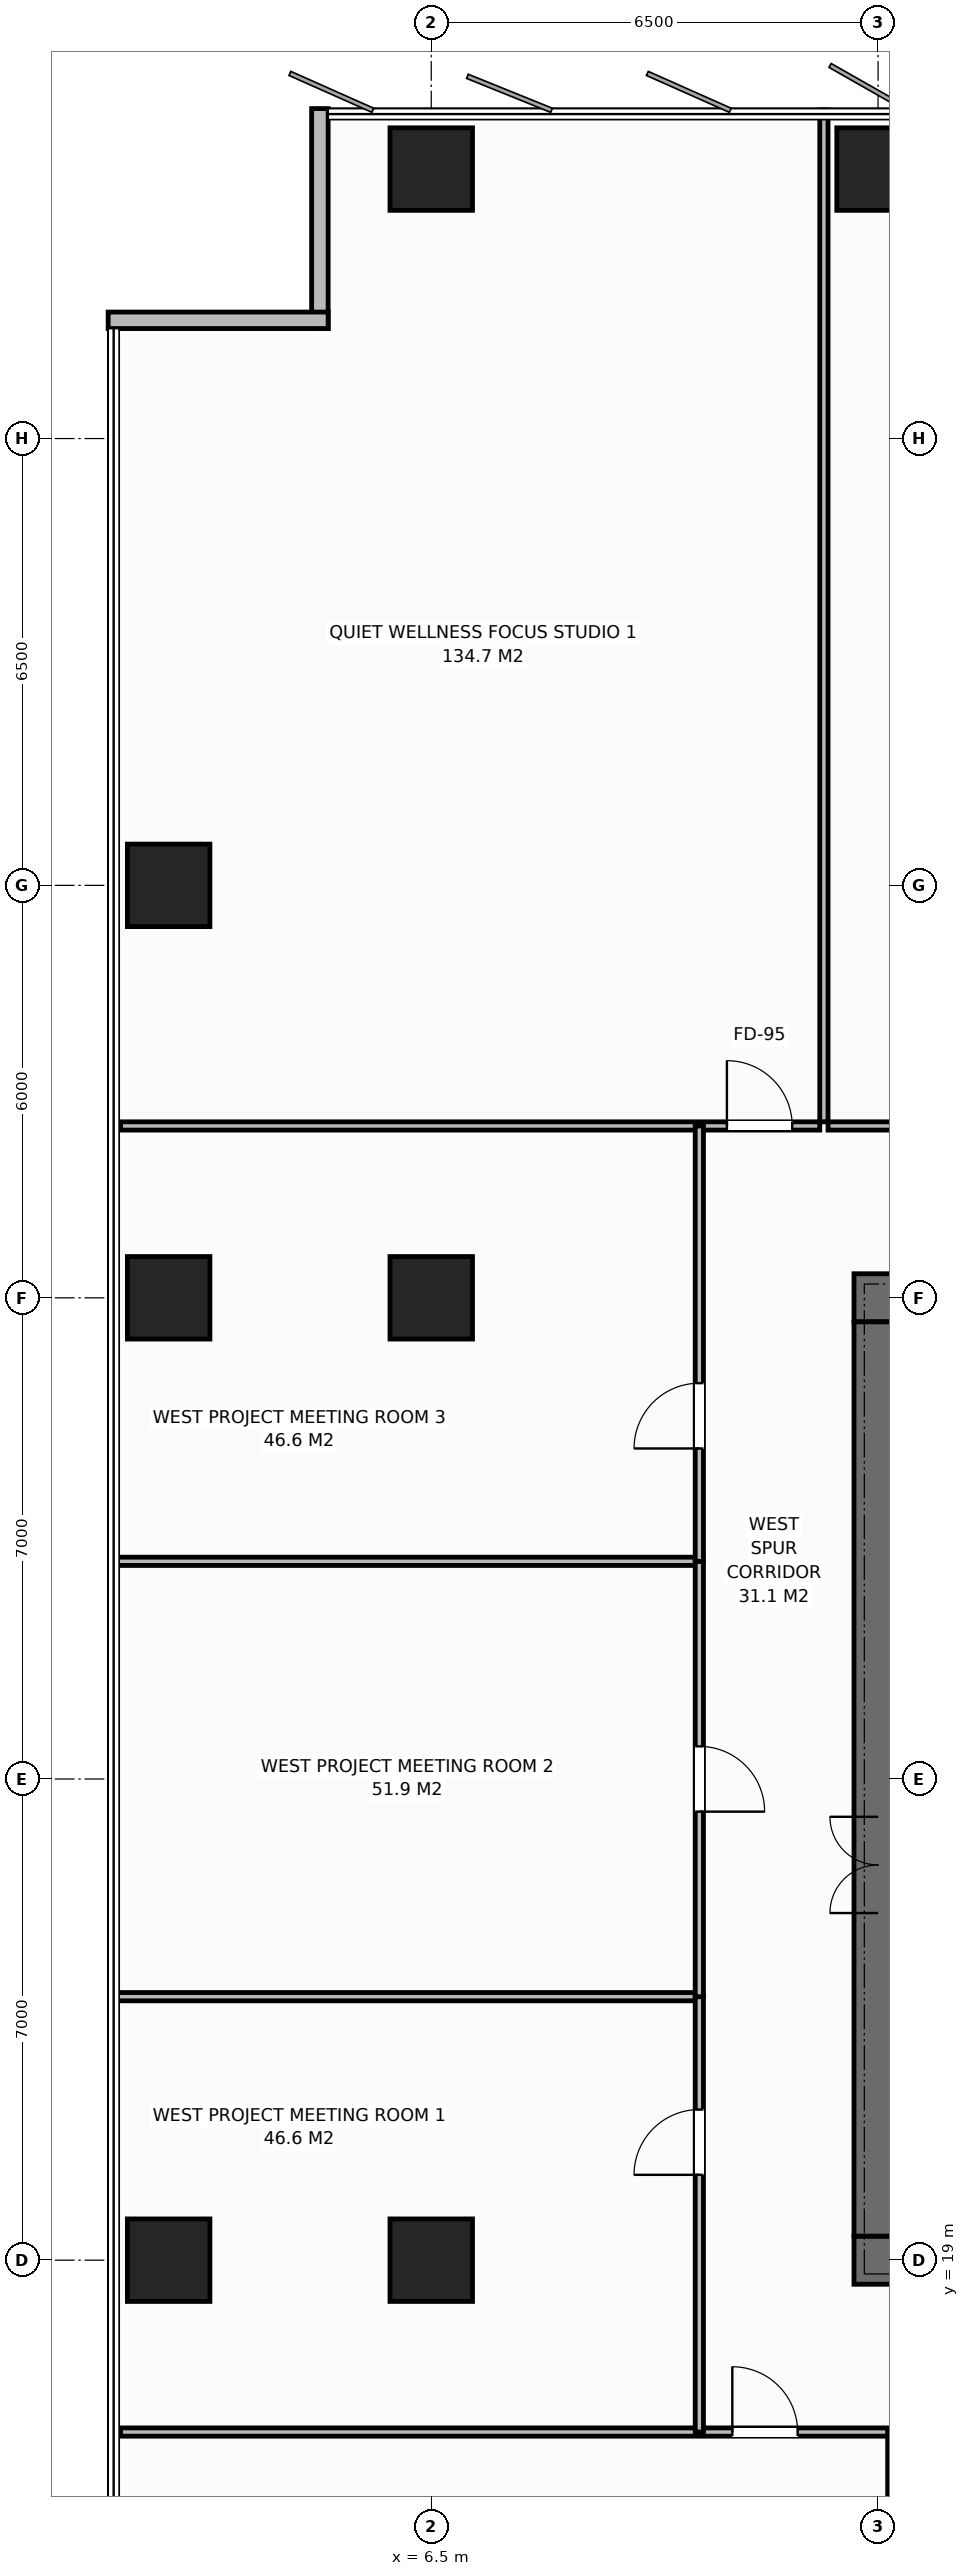
"""IFC4 building model, lengths in metres.
Left out: names, types, materials, properties, quantities, classifications, styles, units other than length and angle.
Written with IfcOpenShell. Run it as: python <this file> out.ifc"""

import sys

from ifc_helpers import new_model, si_unit, direction, frame, frame_2d, origin, origin_2d, place, context, subcontext, project, spatial, rectangle, extrude, element, fill, save


model = new_model("IFC4")
c1 = context("Model", 3, precision=1e-05, world=origin(), true_north=direction((0.0, 1.0)))
c2 = subcontext(c1, "Body", "Model", "MODEL_VIEW")
j1 = project(units=[si_unit("LENGTHUNIT", "METRE"), si_unit("PLANEANGLEUNIT", "RADIAN")], contexts=[c1])
p1 = place(None, origin())
s1 = spatial("IfcSite", under=j1, at=p1, CompositionType="ELEMENT")
p2 = place(p1, origin())
s2 = spatial("IfcBuilding", under=s1, at=p2, CompositionType="ELEMENT")
p3 = place(p2, frame((0.0, 0.0, 120.2)))
s3 = spatial("IfcBuildingStorey", under=s2, at=p3, CompositionType="ELEMENT", Elevation=120.2)
p4 = place(p3, frame((12.65, 19.0, 0.0), z_axis=(0.0, 0.0, 1.0), x_axis=(1.0, 0.0, 0.0)))
e1 = element("IfcWall", 1, at=p4, inside=s3, PredefinedType="SHEAR", context=c2, shape_type="SweptSolid", body=[
    extrude(rectangle(XDim=13.7, YDim=0.7, at=frame_2d((6.85, 0.0))), origin(), (0.0, 0.0, 1.0), 3.8),
])
p5 = place(p4, frame((9.23, 0.0, 0.0)))
e2 = element("IfcOpeningElement", 2, at=p5, cuts=e1, PredefinedType="OPENING", context=c2, shape_type="SweptSolid", body=[
    extrude(rectangle(XDim=1.4, YDim=2.2, at=frame_2d((0.7, 1.1))), frame((0.0, 0.36, 0.0), z_axis=(0.0, -1.0, 0.0), x_axis=(1.0, 0.0, 0.0)), (0.0, 0.0, 1.0), 0.72),
])
p6 = place(p3, frame((12.65, 33.0, 0.0), z_axis=(0.0, 0.0, 1.0), x_axis=(1.0, 0.0, 0.0)))
e3 = element("IfcWall", 3, at=p6, inside=s3, PredefinedType="SHEAR", context=c2, shape_type="SweptSolid", body=[
    extrude(rectangle(XDim=13.7, YDim=0.7, at=frame_2d((6.85, 0.0))), origin(), (0.0, 0.0, 1.0), 3.8),
])
p7 = place(p6, frame((1.25, 0.0, 0.0)))
e4 = element("IfcOpeningElement", 4, at=p7, cuts=e3, PredefinedType="OPENING", context=c2, shape_type="SweptSolid", body=[
    extrude(rectangle(XDim=0.9, YDim=2.15, at=frame_2d((0.45, 1.075))), frame((0.0, 0.36, 0.0), z_axis=(0.0, -1.0, 0.0), x_axis=(1.0, 0.0, 0.0)), (0.0, 0.0, 1.0), 0.72),
])
p8 = place(p6, frame((3.85, 0.0, 0.0)))
e5 = element("IfcOpeningElement", 5, at=p8, cuts=e3, PredefinedType="OPENING", context=c2, shape_type="SweptSolid", body=[
    extrude(rectangle(XDim=0.95, YDim=2.15, at=frame_2d((0.475, 1.075))), frame((0.0, 0.36, 0.0), z_axis=(0.0, -1.0, 0.0), x_axis=(1.0, 0.0, 0.0)), (0.0, 0.0, 1.0), 0.72),
])
p9 = place(p6, frame((6.85, 0.0, 0.0)))
e6 = element("IfcOpeningElement", 6, at=p9, cuts=e3, PredefinedType="OPENING", context=c2, shape_type="SweptSolid", body=[
    extrude(rectangle(XDim=0.95, YDim=2.15, at=frame_2d((0.475, 1.075))), frame((0.0, 0.36, 0.0), z_axis=(0.0, -1.0, 0.0), x_axis=(1.0, 0.0, 0.0)), (0.0, 0.0, 1.0), 0.72),
])
p10 = place(p6, frame((9.23, 0.0, 0.0)))
e7 = element("IfcOpeningElement", 7, at=p10, cuts=e3, PredefinedType="OPENING", context=c2, shape_type="SweptSolid", body=[
    extrude(rectangle(XDim=1.4, YDim=2.2, at=frame_2d((0.7, 1.1))), frame((0.0, 0.36, 0.0), z_axis=(0.0, -1.0, 0.0), x_axis=(1.0, 0.0, 0.0)), (0.0, 0.0, 1.0), 0.72),
])
p11 = place(p3, frame((13.0, 19.35, 0.0), z_axis=(0.0, 0.0, 1.0), x_axis=(0.0, 1.0, 0.0)))
e8 = element("IfcWall", 8, at=p11, inside=s3, PredefinedType="SHEAR", context=c2, shape_type="SweptSolid", body=[
    extrude(rectangle(XDim=13.3, YDim=0.7, at=frame_2d((6.65, 0.0))), origin(), (0.0, 0.0, 1.0), 3.8),
])
p12 = place(p11, frame((4.7, 0.0, 0.0)))
e9 = element("IfcOpeningElement", 9, at=p12, cuts=e8, PredefinedType="OPENING", context=c2, shape_type="SweptSolid", body=[
    extrude(rectangle(XDim=1.4, YDim=2.2, at=frame_2d((0.7, 1.1))), frame((0.0, 0.36, 0.0), z_axis=(0.0, -1.0, 0.0), x_axis=(1.0, 0.0, 0.0)), (0.0, 0.0, 1.0), 0.72),
])
for number, where, z_axis, x_axis in (
    (10, (6.5, 19.0, 0.0), (0.0, 0.0, 1.0), (1.0, 0.0, 0.0)),
    (11, (6.5, 33.0, 0.0), (0.0, 0.0, 1.0), (1.0, 0.0, 0.0)),
    (12, (6.5, 49.42, 0.0), (0.0, 0.0, 1.0), (1.0, 0.0, 0.0)),
    (13, (13.0, 49.42, 0.0), (0.0, 0.0, 1.0), (1.0, 0.0, 0.0)),
    (14, (2.68, 19.0, 0.0), (0.0, 0.0, 1.0), (1.0, 0.0, 0.0)),
    (15, (2.68, 33.0, 0.0), (0.0, 0.0, 1.0), (1.0, 0.0, 0.0)),
    (16, (2.68, 39.0, 0.0), (0.0, 0.0, 1.0), (1.0, 0.0, 0.0)),
):
    element("IfcColumn", number, at=place(p3, frame(where, z_axis=z_axis, x_axis=x_axis)), inside=s3, PredefinedType="COLUMN", context=c2, shape_type="SweptSolid", body=[
        extrude(rectangle(XDim=1.2, YDim=1.2, at=origin_2d()), origin(), (0.0, 0.0, 1.0), 3.8),
    ])
for number, where, z_axis, x_axis in (
    (17, (4.88, 47.1, 0.0), (0.0, 0.0, 1.0), (0.0, 1.0, 0.0)),
    (18, (1.8, 47.22, 0.0), (0.0, 0.0, 1.0), (1.0, 0.0, 0.0)),
):
    element("IfcWall", number, at=place(p3, frame(where, z_axis=z_axis, x_axis=x_axis)), inside=s3, PredefinedType="STANDARD", context=c2, shape_type="SweptSolid", body=[
        extrude(rectangle(XDim=3.2, YDim=0.24, at=frame_2d((1.6, 0.0))), origin(), (0.0, 0.0, 1.0), 3.565),
    ])
p13 = place(p3, frame((12.212, 35.56, 0.0), z_axis=(0.0, 0.0, 1.0), x_axis=(0.0, 1.0, 0.0)))
e19 = element("IfcWall", 19, at=p13, inside=s3, PredefinedType="PARTITIONING", context=c2, shape_type="SweptSolid", body=[
    extrude(rectangle(XDim=14.72, YDim=0.12, at=frame_2d((7.36, 0.0))), origin(), (0.0, 0.0, 1.0), 3.565),
])
p14 = place(p3, frame((1.98, 35.5, 0.0), z_axis=(0.0, 0.0, 1.0), x_axis=(1.0, 0.0, 0.0)))
e20 = element("IfcWall", 20, at=p14, inside=s3, PredefinedType="PARTITIONING", context=c2, shape_type="SweptSolid", body=[
    extrude(rectangle(XDim=10.172, YDim=0.12, at=frame_2d((5.086, 0.0))), origin(), (0.0, 0.0, 1.0), 3.565),
])
p15 = place(p14, frame((8.821, 0.0, 0.0)))
e21 = element("IfcOpeningElement", 21, at=p15, cuts=e20, PredefinedType="OPENING", context=c2, shape_type="SweptSolid", body=[
    extrude(rectangle(XDim=0.95, YDim=2.15, at=frame_2d((0.475, 1.075))), frame((0.0, 0.07, 0.0), z_axis=(0.0, -1.0, 0.0), x_axis=(1.0, 0.0, 0.0)), (0.0, 0.0, 1.0), 0.14),
])
p16 = place(p3, frame((12.272, 35.5, 0.0), z_axis=(0.0, 0.0, 1.0), x_axis=(1.0, 0.0, 0.0)))
e22 = element("IfcWall", 22, at=p16, inside=s3, PredefinedType="PARTITIONING", context=c2, shape_type="SweptSolid", body=[
    extrude(rectangle(XDim=6.322, YDim=0.12, at=frame_2d((3.161, 0.0))), origin(), (0.0, 0.0, 1.0), 3.565),
])
p17 = place(p16, frame((2.686, 0.0, 0.0)))
e23 = element("IfcOpeningElement", 23, at=p17, cuts=e22, PredefinedType="OPENING", context=c2, shape_type="SweptSolid", body=[
    extrude(rectangle(XDim=0.95, YDim=2.15, at=frame_2d((0.475, 1.075))), frame((0.0, 0.07, 0.0), z_axis=(0.0, -1.0, 0.0), x_axis=(1.0, 0.0, 0.0)), (0.0, 0.0, 1.0), 0.14),
])
p18 = place(p3, frame((13.2, 1.72, 0.0), z_axis=(0.0, 0.0, 1.0), x_axis=(0.0, 1.0, 0.0)))
e24 = element("IfcWall", 24, at=p18, inside=s3, PredefinedType="PARTITIONING", context=c2, shape_type="SweptSolid", body=[
    extrude(rectangle(XDim=14.72, YDim=0.12, at=frame_2d((7.36, 0.0))), origin(), (0.0, 0.0, 1.0), 2.965),
])
p19 = place(p3, frame((1.98, 16.5, 0.0), z_axis=(0.0, 0.0, 1.0), x_axis=(1.0, 0.0, 0.0)))
e25 = element("IfcWall", 25, at=p19, inside=s3, PredefinedType="PARTITIONING", context=c2, shape_type="SweptSolid", body=[
    extrude(rectangle(XDim=11.16, YDim=0.12, at=frame_2d((5.58, 0.0))), origin(), (0.0, 0.0, 1.0), 3.565),
])
p20 = place(p19, frame((8.9, 0.0, 0.0)))
e26 = element("IfcOpeningElement", 26, at=p20, cuts=e25, PredefinedType="OPENING", context=c2, shape_type="SweptSolid", body=[
    extrude(rectangle(XDim=0.95, YDim=2.15, at=frame_2d((0.475, 1.075))), frame((0.0, 0.07, 0.0), z_axis=(0.0, -1.0, 0.0), x_axis=(1.0, 0.0, 0.0)), (0.0, 0.0, 1.0), 0.14),
])
p21 = place(p3, frame((1.82, 22.833, 0.0), z_axis=(0.0, 0.0, 1.0), x_axis=(1.0, 0.0, 0.0)))
e27 = element("IfcWall", 27, at=p21, inside=s3, PredefinedType="PARTITIONING", context=c2, shape_type="SweptSolid", body=[
    extrude(rectangle(XDim=8.58, YDim=0.12, at=frame_2d((4.29, 0.0))), origin(), (0.0, 0.0, 1.0), 3.565),
])
p22 = place(p3, frame((10.4, 16.5, 0.0), z_axis=(0.0, 0.0, 1.0), x_axis=(0.0, 1.0, 0.0)))
e28 = element("IfcWall", 28, at=p22, inside=s3, PredefinedType="PARTITIONING", context=c2, shape_type="SweptSolid", body=[
    extrude(rectangle(XDim=6.333, YDim=0.12, at=frame_2d((3.167, 0.0))), origin(), (0.0, 0.0, 1.0), 3.565),
])
p23 = place(p22, frame((3.742, 0.0, 0.0)))
e29 = element("IfcOpeningElement", 29, at=p23, cuts=e28, PredefinedType="OPENING", context=c2, shape_type="SweptSolid", body=[
    extrude(rectangle(XDim=0.95, YDim=2.15, at=frame_2d((0.475, 1.075))), frame((0.0, 0.07, 0.0), z_axis=(0.0, -1.0, 0.0), x_axis=(1.0, 0.0, 0.0)), (0.0, 0.0, 1.0), 0.14),
])
p24 = place(p3, frame((1.82, 29.167, 0.0), z_axis=(0.0, 0.0, 1.0), x_axis=(1.0, 0.0, 0.0)))
e30 = element("IfcWall", 30, at=p24, inside=s3, PredefinedType="PARTITIONING", context=c2, shape_type="SweptSolid", body=[
    extrude(rectangle(XDim=8.58, YDim=0.12, at=frame_2d((4.29, 0.0))), origin(), (0.0, 0.0, 1.0), 3.565),
])
p25 = place(p3, frame((10.4, 22.833, 0.0), z_axis=(0.0, 0.0, 1.0), x_axis=(0.0, 1.0, 0.0)))
e31 = element("IfcWall", 31, at=p25, inside=s3, PredefinedType="PARTITIONING", context=c2, shape_type="SweptSolid", body=[
    extrude(rectangle(XDim=6.333, YDim=0.12, at=frame_2d((3.167, 0.0))), origin(), (0.0, 0.0, 1.0), 3.565),
])
p26 = place(p25, frame((2.692, 0.0, 0.0)))
e32 = element("IfcOpeningElement", 32, at=p26, cuts=e31, PredefinedType="OPENING", context=c2, shape_type="SweptSolid", body=[
    extrude(rectangle(XDim=0.95, YDim=2.15, at=frame_2d((0.475, 1.075))), frame((0.0, 0.07, 0.0), z_axis=(0.0, -1.0, 0.0), x_axis=(1.0, 0.0, 0.0)), (0.0, 0.0, 1.0), 0.14),
])
p27 = place(p3, frame((10.4, 29.167, 0.0), z_axis=(0.0, 0.0, 1.0), x_axis=(0.0, 1.0, 0.0)))
e33 = element("IfcWall", 33, at=p27, inside=s3, PredefinedType="PARTITIONING", context=c2, shape_type="SweptSolid", body=[
    extrude(rectangle(XDim=6.333, YDim=0.12, at=frame_2d((3.167, 0.0))), origin(), (0.0, 0.0, 1.0), 3.565),
])
p28 = place(p27, frame((1.642, 0.0, 0.0)))
e34 = element("IfcOpeningElement", 34, at=p28, cuts=e33, PredefinedType="OPENING", context=c2, shape_type="SweptSolid", body=[
    extrude(rectangle(XDim=0.95, YDim=2.15, at=frame_2d((0.475, 1.075))), frame((0.0, 0.07, 0.0), z_axis=(0.0, -1.0, 0.0), x_axis=(1.0, 0.0, 0.0)), (0.0, 0.0, 1.0), 0.14),
])
p29 = place(p12, origin())
e35 = element("IfcDoor", 35, at=p29, inside=s3, OperationType="DOUBLE_DOOR_SINGLE_SWING", PredefinedType="DOOR", context=c2, shape_type="SweptSolid", body=[
    extrude(rectangle(XDim=1.4, YDim=2.2, at=frame_2d((0.7, 1.1))), frame((0.0, 0.025, 0.0), z_axis=(0.0, -1.0, 0.0), x_axis=(1.0, 0.0, 0.0)), (0.0, 0.0, 1.0), 0.05),
])
fill(e9, e35)
p30 = place(p15, origin())
e36 = element("IfcDoor", 36, at=p30, inside=s3, OperationType="SINGLE_SWING_LEFT", PredefinedType="DOOR", context=c2, shape_type="SweptSolid", body=[
    extrude(rectangle(XDim=0.95, YDim=2.15, at=frame_2d((0.475, 1.075))), frame((0.0, 0.025, 0.0), z_axis=(0.0, -1.0, 0.0), x_axis=(1.0, 0.0, 0.0)), (0.0, 0.0, 1.0), 0.05),
])
fill(e21, e36)
p31 = place(p20, origin())
e37 = element("IfcDoor", 37, at=p31, inside=s3, OperationType="SINGLE_SWING_LEFT", PredefinedType="DOOR", context=c2, shape_type="SweptSolid", body=[
    extrude(rectangle(XDim=0.95, YDim=2.15, at=frame_2d((0.475, 1.075))), frame((0.0, 0.025, 0.0), z_axis=(0.0, -1.0, 0.0), x_axis=(1.0, 0.0, 0.0)), (0.0, 0.0, 1.0), 0.05),
])
fill(e26, e37)
p32 = place(p23, origin())
e38 = element("IfcDoor", 38, at=p32, inside=s3, OperationType="SINGLE_SWING_LEFT", PredefinedType="DOOR", context=c2, shape_type="SweptSolid", body=[
    extrude(rectangle(XDim=0.95, YDim=2.15, at=frame_2d((0.475, 1.075))), frame((0.0, 0.025, 0.0), z_axis=(0.0, -1.0, 0.0), x_axis=(1.0, 0.0, 0.0)), (0.0, 0.0, 1.0), 0.05),
])
fill(e29, e38)
p33 = place(p26, origin())
e39 = element("IfcDoor", 39, at=p33, inside=s3, OperationType="SINGLE_SWING_RIGHT", PredefinedType="DOOR", context=c2, shape_type="SweptSolid", body=[
    extrude(rectangle(XDim=0.95, YDim=2.15, at=frame_2d((0.475, 1.075))), frame((0.0, 0.025, 0.0), z_axis=(0.0, -1.0, 0.0), x_axis=(1.0, 0.0, 0.0)), (0.0, 0.0, 1.0), 0.05),
])
fill(e32, e39)
p34 = place(p28, origin())
e40 = element("IfcDoor", 40, at=p34, inside=s3, OperationType="SINGLE_SWING_LEFT", PredefinedType="DOOR", context=c2, shape_type="SweptSolid", body=[
    extrude(rectangle(XDim=0.95, YDim=2.15, at=frame_2d((0.475, 1.075))), frame((0.0, 0.025, 0.0), z_axis=(0.0, -1.0, 0.0), x_axis=(1.0, 0.0, 0.0)), (0.0, 0.0, 1.0), 0.05),
])
fill(e34, e40)
save(model, sys.argv[1])
